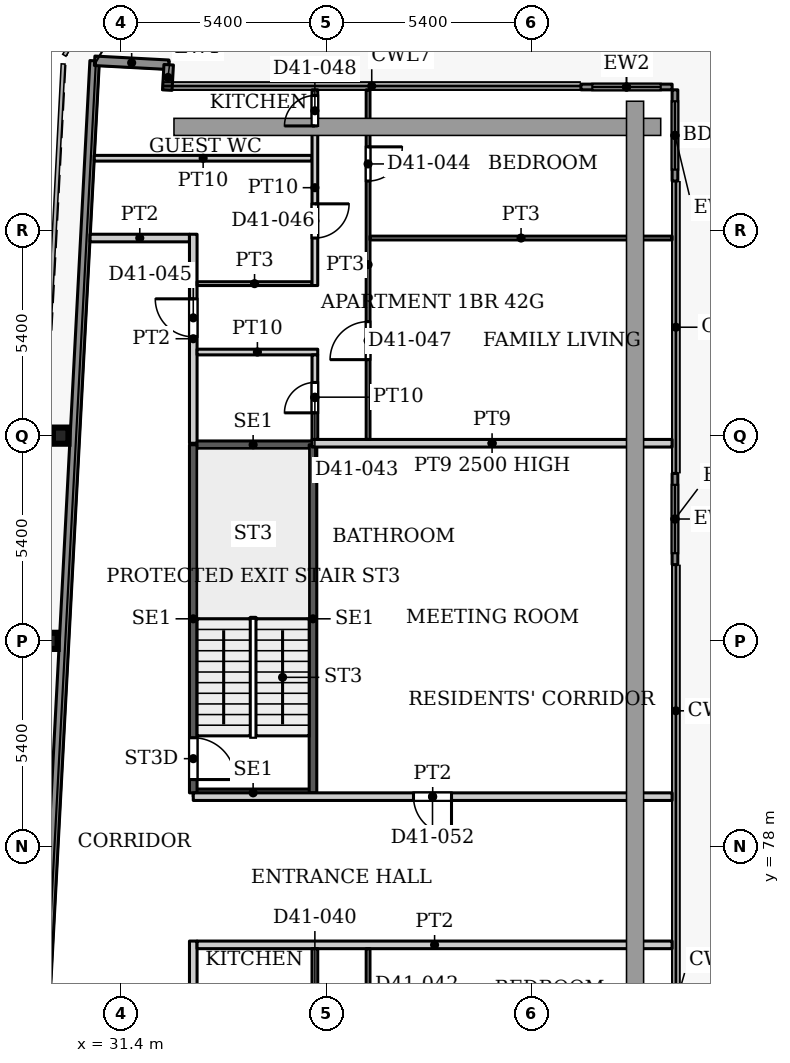
"""IFC4 building model, lengths in metres.
Left out: names, types, materials, properties, quantities, classifications, styles, units other than length and angle.
Written with IfcOpenShell. Run it as: python <this file> out.ifc"""

import sys

from ifc_helpers import new_model, si_unit, direction, frame, frame_2d, origin, origin_2d, place, context, subcontext, project, spatial, rectangle, i_section, extrude, source, transform, mapped, element, fill, save


model = new_model("IFC4")
c1 = context("Model", 3, precision=1e-05, world=origin(), true_north=direction((0.0, 1.0)))
c2 = subcontext(c1, "Body", "Model", "MODEL_VIEW")
j1 = project(units=[si_unit("LENGTHUNIT", "METRE"), si_unit("PLANEANGLEUNIT", "RADIAN")], contexts=[c1])
p1 = place(None, origin())
s1 = spatial("IfcSite", under=j1, at=p1, CompositionType="ELEMENT")
p2 = place(p1, origin())
s2 = spatial("IfcBuilding", under=s1, at=p2, CompositionType="ELEMENT")
p3 = place(p2, frame((0.0, 0.0, 179.9)))
s3 = spatial("IfcBuildingStorey", under=s2, at=p3, CompositionType="ELEMENT", Elevation=179.9)
for number, where, z_axis, x_axis in (
    (1, (29.527, 83.4, 0.0), (0.0, 0.0, 1.0), (1.0, 0.0, 0.0)),
    (2, (29.811, 88.8, 0.0), (0.0, 0.0, 1.0), (1.0, 0.0, 0.0)),
):
    element("IfcColumn", number, at=place(p3, frame(where, z_axis=z_axis, x_axis=x_axis)), inside=s3, PredefinedType="COLUMN", context=c2, shape_type="SweptSolid", body=[
        extrude(i_section(OverallWidth=0.409, OverallDepth=0.425, WebThickness=0.033, FlangeThickness=0.052, FilletRadius=0.013, at=origin_2d()), origin(), (0.0, 0.0, 1.0), 3.9),
    ])
p4 = place(p3, frame((27.195, 31.969, 0.0), z_axis=(0.0, 0.0, 1.0), x_axis=(0.052554995867, 0.998618031286, 0.0)))
e3 = element("IfcWall", 3, at=p4, inside=s3, PredefinedType="SOLIDWALL", context=c2, shape_type="SweptSolid", body=[
    extrude(rectangle(XDim=66.787, YDim=0.25, at=frame_2d((33.394, 0.0))), origin(), (0.0, 0.0, 1.0), 3.75),
])
p5 = place(p3, frame((30.705, 98.664, 0.0), z_axis=(0.0, 0.0, 1.0), x_axis=(0.998577785791, -0.053314216913, 0.0)))
e4 = element("IfcWall", 4, at=p5, inside=s3, PredefinedType="SOLIDWALL", context=c2, shape_type="SweptSolid", body=[
    extrude(rectangle(XDim=1.951, YDim=0.25, at=frame_2d((0.975, 0.0))), origin(), (0.0, 0.0, 1.0), 3.75),
])
p6 = place(p3, frame((32.653, 98.56, 0.0), z_axis=(0.0, 0.0, 1.0), x_axis=(-0.054093451632, -0.998535877418, 0.0)))
e5 = element("IfcWall", 5, at=p6, inside=s3, PredefinedType="SOLIDWALL", context=c2, shape_type="SweptSolid", body=[
    extrude(rectangle(XDim=0.668, YDim=0.25, at=frame_2d((0.334, 0.0))), origin(), (0.0, 0.0, 1.0), 3.75),
])
p7 = place(p3, frame((43.5, 97.975, 0.0), z_axis=(0.0, 0.0, 1.0), x_axis=(1.0, 0.0, 0.0)))
e6 = element("IfcWall", 6, at=p7, inside=s3, PredefinedType="SOLIDWALL", context=c2, shape_type="SweptSolid", body=[
    extrude(rectangle(XDim=2.4, YDim=0.15, at=frame_2d((1.2, 0.0))), origin(), (0.0, 0.0, 1.0), 3.75),
])
p8 = place(p7, frame((0.3, 0.0, 0.0)))
e7 = element("IfcOpeningElement", 7, at=p8, cuts=e6, PredefinedType="OPENING", context=c2, shape_type="SweptSolid", body=[
    extrude(rectangle(XDim=1.8, YDim=2.4, at=frame_2d((0.9, 1.2))), frame((0.0, 0.085, 0.0), z_axis=(0.0, -1.0, 0.0), x_axis=(1.0, 0.0, 0.0)), (0.0, 0.0, 1.0), 0.17),
])
p9 = place(p3, frame((45.975, 97.9, 0.0), z_axis=(0.0, 0.0, 1.0), x_axis=(0.0, -1.0, 0.0)))
e8 = element("IfcWall", 8, at=p9, inside=s3, PredefinedType="SOLIDWALL", context=c2, shape_type="SweptSolid", body=[
    extrude(rectangle(XDim=2.4, YDim=0.15, at=frame_2d((1.2, 0.0))), origin(), (0.0, 0.0, 1.0), 3.75),
])
p10 = place(p9, frame((0.3, 0.0, 0.0)))
e9 = element("IfcOpeningElement", 9, at=p10, cuts=e8, PredefinedType="OPENING", context=c2, shape_type="SweptSolid", body=[
    extrude(rectangle(XDim=1.8, YDim=2.4, at=frame_2d((0.9, 1.2))), frame((0.0, 0.085, 0.0), z_axis=(0.0, -1.0, 0.0), x_axis=(1.0, 0.0, 0.0)), (0.0, 0.0, 1.0), 0.17),
])
p11 = place(p3, frame((45.975, 87.806, 0.0), z_axis=(0.0, 0.0, 1.0), x_axis=(0.0, -1.0, 0.0)))
e10 = element("IfcWall", 10, at=p11, inside=s3, PredefinedType="SOLIDWALL", context=c2, shape_type="SweptSolid", body=[
    extrude(rectangle(XDim=2.4, YDim=0.15, at=frame_2d((1.2, 0.0))), origin(), (0.0, 0.0, 1.0), 3.75),
])
p12 = place(p11, frame((0.3, 0.0, 0.0)))
e11 = element("IfcOpeningElement", 11, at=p12, cuts=e10, PredefinedType="OPENING", context=c2, shape_type="SweptSolid", body=[
    extrude(rectangle(XDim=1.8, YDim=2.4, at=frame_2d((0.9, 1.2))), frame((0.0, 0.085, 0.0), z_axis=(0.0, -1.0, 0.0), x_axis=(1.0, 0.0, 0.0)), (0.0, 0.0, 1.0), 0.17),
])
for number, where, z_axis, x_axis in (
    (12, (33.3, 79.4, 0.0), (0.0, 0.0, 1.0), (1.0, 0.0, 0.0)),
    (13, (33.3, 88.56, 0.0), (0.0, 0.0, 1.0), (1.0, 0.0, 0.0)),
):
    element("IfcWall", number, at=place(p3, frame(where, z_axis=z_axis, x_axis=x_axis)), inside=s3, PredefinedType="SHEAR", context=c2, shape_type="SweptSolid", body=[
        extrude(rectangle(XDim=3.15, YDim=0.2, at=frame_2d((1.575, 0.0))), origin(), (0.0, 0.0, 1.0), 3.9),
    ])
p13 = place(p3, frame((33.3, 79.4, 0.0), z_axis=(0.0, 0.0, 1.0), x_axis=(0.0, 1.0, 0.0)))
e14 = element("IfcWall", 14, at=p13, inside=s3, PredefinedType="SHEAR", context=c2, shape_type="SweptSolid", body=[
    extrude(rectangle(XDim=9.16, YDim=0.2, at=frame_2d((4.58, 0.0))), origin(), (0.0, 0.0, 1.0), 3.9),
])
p14 = place(p13, frame((0.35, 0.0, 0.0)))
e15 = element("IfcOpeningElement", 15, at=p14, cuts=e14, PredefinedType="OPENING", context=c2, shape_type="SweptSolid", body=[
    extrude(rectangle(XDim=1.1, YDim=2.2, at=frame_2d((0.55, 1.1))), frame((0.0, 0.11, 0.0), z_axis=(0.0, -1.0, 0.0), x_axis=(1.0, 0.0, 0.0)), (0.0, 0.0, 1.0), 0.22),
])
p15 = place(p3, frame((36.45, 79.4, 0.0), z_axis=(0.0, 0.0, 1.0), x_axis=(0.0, 1.0, 0.0)))
e16 = element("IfcWall", 16, at=p15, inside=s3, PredefinedType="SHEAR", context=c2, shape_type="SweptSolid", body=[
    extrude(rectangle(XDim=9.16, YDim=0.2, at=frame_2d((4.58, 0.0))), origin(), (0.0, 0.0, 1.0), 3.9),
])
p16 = place(p3, frame((30.695, 96.1, 0.0), z_axis=(0.0, 0.0, 1.0), x_axis=(1.0, 0.0, 0.0)))
e17 = element("IfcWall", 17, at=p16, inside=s3, PredefinedType="PARTITIONING", context=c2, shape_type="SweptSolid", body=[
    extrude(rectangle(XDim=5.73, YDim=0.15, at=frame_2d((2.865, 0.0))), origin(), (0.0, 0.0, 1.0), 3.6),
])
p17 = place(p3, frame((30.585, 94.0, 0.0), z_axis=(0.0, 0.0, 1.0), x_axis=(1.0, 0.0, 0.0)))
e18 = element("IfcWall", 18, at=p17, inside=s3, PredefinedType="PARTITIONING", context=c2, shape_type="SweptSolid", body=[
    extrude(rectangle(XDim=2.615, YDim=0.2, at=frame_2d((1.308, 0.0))), origin(), (0.0, 0.0, 1.0), 3.6),
])
p18 = place(p3, frame((33.3, 57.9, 0.0), z_axis=(0.0, 0.0, 1.0), x_axis=(0.0, 1.0, 0.0)))
e19 = element("IfcWall", 19, at=p18, inside=s3, PredefinedType="PARTITIONING", context=c2, shape_type="SweptSolid", body=[
    extrude(rectangle(XDim=17.6, YDim=0.2, at=frame_2d((8.8, 0.0))), origin(), (0.0, 0.0, 1.0), 3.6),
])
p19 = place(p18, frame((7.4, 0.0, 0.0)))
e20 = element("IfcOpeningElement", 20, at=p19, cuts=e19, PredefinedType="OPENING", context=c2, shape_type="SweptSolid", body=[
    extrude(rectangle(XDim=1.0, YDim=2.1, at=frame_2d((0.5, 1.05))), frame((0.0, 0.11, 0.0), z_axis=(0.0, -1.0, 0.0), x_axis=(1.0, 0.0, 0.0)), (0.0, 0.0, 1.0), 0.22),
])
p20 = place(p18, frame((9.2, 0.0, 0.0)))
e21 = element("IfcOpeningElement", 21, at=p20, cuts=e19, PredefinedType="OPENING", context=c2, shape_type="SweptSolid", body=[
    extrude(rectangle(XDim=1.0, YDim=2.1, at=frame_2d((0.5, 1.05))), frame((0.0, 0.11, 0.0), z_axis=(0.0, -1.0, 0.0), x_axis=(1.0, 0.0, 0.0)), (0.0, 0.0, 1.0), 0.22),
])
p21 = place(p3, frame((33.3, 79.3, 0.0), z_axis=(0.0, 0.0, 1.0), x_axis=(1.0, 0.0, 0.0)))
e22 = element("IfcWall", 22, at=p21, inside=s3, PredefinedType="PARTITIONING", context=c2, shape_type="SweptSolid", body=[
    extrude(rectangle(XDim=12.6, YDim=0.2, at=frame_2d((6.3, 0.0))), origin(), (0.0, 0.0, 1.0), 3.6),
])
p22 = place(p21, frame((5.795, 0.0, 0.0)))
e23 = element("IfcOpeningElement", 23, at=p22, cuts=e22, PredefinedType="OPENING", context=c2, shape_type="SweptSolid", body=[
    extrude(rectangle(XDim=1.0, YDim=2.1, at=frame_2d((0.5, 1.05))), frame((0.0, 0.11, 0.0), z_axis=(0.0, -1.0, 0.0), x_axis=(1.0, 0.0, 0.0)), (0.0, 0.0, 1.0), 0.22),
])
p23 = place(p3, frame((33.3, 88.6, 0.0), z_axis=(0.0, 0.0, 1.0), x_axis=(0.0, 1.0, 0.0)))
e24 = element("IfcWall", 24, at=p23, inside=s3, PredefinedType="PARTITIONING", context=c2, shape_type="SweptSolid", body=[
    extrude(rectangle(XDim=5.5, YDim=0.2, at=frame_2d((2.75, 0.0))), origin(), (0.0, 0.0, 1.0), 3.6),
])
p24 = place(p23, frame((2.8, 0.0, 0.0)))
e25 = element("IfcOpeningElement", 25, at=p24, cuts=e24, PredefinedType="OPENING", context=c2, shape_type="SweptSolid", body=[
    extrude(rectangle(XDim=1.0, YDim=2.1, at=frame_2d((0.5, 1.05))), frame((0.0, 0.11, 0.0), z_axis=(0.0, -1.0, 0.0), x_axis=(1.0, 0.0, 0.0)), (0.0, 0.0, 1.0), 0.22),
])
p25 = place(p3, frame((33.4, 75.4, 0.0), z_axis=(0.0, 0.0, 1.0), x_axis=(1.0, 0.0, 0.0)))
e26 = element("IfcWall", 26, at=p25, inside=s3, PredefinedType="PARTITIONING", context=c2, shape_type="SweptSolid", body=[
    extrude(rectangle(XDim=12.5, YDim=0.2, at=frame_2d((6.25, 0.0))), origin(), (0.0, 0.0, 1.0), 3.6),
])
p26 = place(p3, frame((33.4, 91.0, 0.0), z_axis=(0.0, 0.0, 1.0), x_axis=(1.0, 0.0, 0.0)))
e27 = element("IfcWall", 27, at=p26, inside=s3, PredefinedType="PARTITIONING", context=c2, shape_type="SweptSolid", body=[
    extrude(rectangle(XDim=3.175, YDim=0.15, at=frame_2d((1.587, 0.0))), origin(), (0.0, 0.0, 1.0), 3.6),
])
p27 = place(p3, frame((33.4, 92.8, 0.0), z_axis=(0.0, 0.0, 1.0), x_axis=(1.0, 0.0, 0.0)))
e28 = element("IfcWall", 28, at=p27, inside=s3, PredefinedType="PARTITIONING", context=c2, shape_type="SweptSolid", body=[
    extrude(rectangle(XDim=3.025, YDim=0.1, at=frame_2d((1.513, 0.0))), origin(), (0.0, 0.0, 1.0), 3.6),
])
p28 = place(p3, frame((36.425, 88.6, 0.0), z_axis=(0.0, 0.0, 1.0), x_axis=(1.0, 0.0, 0.0)))
e29 = element("IfcWall", 29, at=p28, inside=s3, PredefinedType="PARTITIONING", context=c2, shape_type="SweptSolid", body=[
    extrude(rectangle(XDim=9.475, YDim=0.2, at=frame_2d((4.737, 0.0))), origin(), (0.0, 0.0, 1.0), 2.5),
])
p29 = place(p3, frame((36.5, 68.425, 0.0), z_axis=(0.0, 0.0, 1.0), x_axis=(0.0, 1.0, 0.0)))
e30 = element("IfcWall", 30, at=p29, inside=s3, PredefinedType="PARTITIONING", context=c2, shape_type="SweptSolid", body=[
    extrude(rectangle(XDim=6.875, YDim=0.15, at=frame_2d((3.438, 0.0))), origin(), (0.0, 0.0, 1.0), 3.6),
])
p30 = place(p29, frame((0.875, 0.0, 0.0)))
e31 = element("IfcOpeningElement", 31, at=p30, cuts=e30, PredefinedType="OPENING", context=c2, shape_type="SweptSolid", body=[
    extrude(rectangle(XDim=0.8, YDim=2.1, at=frame_2d((0.4, 1.05))), frame((0.0, 0.085, 0.0), z_axis=(0.0, -1.0, 0.0), x_axis=(1.0, 0.0, 0.0)), (0.0, 0.0, 1.0), 0.17),
])
p31 = place(p29, frame((5.025, 0.0, 0.0)))
e32 = element("IfcOpeningElement", 32, at=p31, cuts=e30, PredefinedType="OPENING", context=c2, shape_type="SweptSolid", body=[
    extrude(rectangle(XDim=0.9, YDim=2.1, at=frame_2d((0.45, 1.05))), frame((0.0, 0.085, 0.0), z_axis=(0.0, -1.0, 0.0), x_axis=(1.0, 0.0, 0.0)), (0.0, 0.0, 1.0), 0.17),
])
p32 = place(p29, frame((2.825, 0.0, 0.0)))
e33 = element("IfcOpeningElement", 33, at=p32, cuts=e30, PredefinedType="OPENING", context=c2, shape_type="SweptSolid", body=[
    extrude(rectangle(XDim=0.8, YDim=2.1, at=frame_2d((0.4, 1.05))), frame((0.0, 0.085, 0.0), z_axis=(0.0, -1.0, 0.0), x_axis=(1.0, 0.0, 0.0)), (0.0, 0.0, 1.0), 0.17),
])
p33 = place(p3, frame((36.5, 88.7, 0.0), z_axis=(0.0, 0.0, 1.0), x_axis=(0.0, 1.0, 0.0)))
e34 = element("IfcWall", 34, at=p33, inside=s3, PredefinedType="PARTITIONING", context=c2, shape_type="SweptSolid", body=[
    extrude(rectangle(XDim=2.225, YDim=0.15, at=frame_2d((1.113, 0.0))), origin(), (0.0, 0.0, 1.0), 3.6),
])
p34 = place(p33, frame((0.7, 0.0, 0.0)))
e35 = element("IfcOpeningElement", 35, at=p34, cuts=e34, PredefinedType="OPENING", context=c2, shape_type="SweptSolid", body=[
    extrude(rectangle(XDim=0.8, YDim=2.1, at=frame_2d((0.4, 1.05))), frame((0.0, 0.085, 0.0), z_axis=(0.0, -1.0, 0.0), x_axis=(1.0, 0.0, 0.0)), (0.0, 0.0, 1.0), 0.17),
])
p35 = place(p3, frame((36.5, 92.75, 0.0), z_axis=(0.0, 0.0, 1.0), x_axis=(0.0, 1.0, 0.0)))
e36 = element("IfcWall", 36, at=p35, inside=s3, PredefinedType="PARTITIONING", context=c2, shape_type="SweptSolid", body=[
    extrude(rectangle(XDim=5.15, YDim=0.15, at=frame_2d((2.575, 0.0))), origin(), (0.0, 0.0, 1.0), 3.6),
])
p36 = place(p35, frame((1.25, 0.0, 0.0)))
e37 = element("IfcOpeningElement", 37, at=p36, cuts=e36, PredefinedType="OPENING", context=c2, shape_type="SweptSolid", body=[
    extrude(rectangle(XDim=0.9, YDim=2.1, at=frame_2d((0.45, 1.05))), frame((0.0, 0.085, 0.0), z_axis=(0.0, -1.0, 0.0), x_axis=(1.0, 0.0, 0.0)), (0.0, 0.0, 1.0), 0.17),
])
p37 = place(p35, frame((4.2, 0.0, 0.0)))
e38 = element("IfcOpeningElement", 38, at=p37, cuts=e36, PredefinedType="OPENING", context=c2, shape_type="SweptSolid", body=[
    extrude(rectangle(XDim=0.8, YDim=2.1, at=frame_2d((0.4, 1.05))), frame((0.0, 0.085, 0.0), z_axis=(0.0, -1.0, 0.0), x_axis=(1.0, 0.0, 0.0)), (0.0, 0.0, 1.0), 0.17),
])
p38 = place(p3, frame((37.9, 66.8, 0.0), z_axis=(0.0, 0.0, 1.0), x_axis=(0.0, 1.0, 0.0)))
e39 = element("IfcWall", 39, at=p38, inside=s3, PredefinedType="PARTITIONING", context=c2, shape_type="SweptSolid", body=[
    extrude(rectangle(XDim=8.5, YDim=0.1, at=frame_2d((4.25, 0.0))), origin(), (0.0, 0.0, 1.0), 3.6),
])
p39 = place(p38, frame((6.2, 0.0, 0.0)))
e40 = element("IfcOpeningElement", 40, at=p39, cuts=e39, PredefinedType="OPENING", context=c2, shape_type="SweptSolid", body=[
    extrude(rectangle(XDim=0.9, YDim=2.1, at=frame_2d((0.45, 1.05))), frame((0.0, 0.06, 0.0), z_axis=(0.0, -1.0, 0.0), x_axis=(1.0, 0.0, 0.0)), (0.0, 0.0, 1.0), 0.12),
])
p40 = place(p38, frame((1.8, 0.0, 0.0)))
e41 = element("IfcOpeningElement", 41, at=p40, cuts=e39, PredefinedType="OPENING", context=c2, shape_type="SweptSolid", body=[
    extrude(rectangle(XDim=1.0, YDim=2.1, at=frame_2d((0.5, 1.05))), frame((0.0, 0.06, 0.0), z_axis=(0.0, -1.0, 0.0), x_axis=(1.0, 0.0, 0.0)), (0.0, 0.0, 1.0), 0.12),
])
p41 = place(p3, frame((37.9, 88.7, 0.0), z_axis=(0.0, 0.0, 1.0), x_axis=(0.0, 1.0, 0.0)))
e42 = element("IfcWall", 42, at=p41, inside=s3, PredefinedType="PARTITIONING", context=c2, shape_type="SweptSolid", body=[
    extrude(rectangle(XDim=9.2, YDim=0.1, at=frame_2d((4.6, 0.0))), origin(), (0.0, 0.0, 1.0), 3.6),
])
p42 = place(p41, frame((6.8, 0.0, 0.0)))
e43 = element("IfcOpeningElement", 43, at=p42, cuts=e42, PredefinedType="OPENING", context=c2, shape_type="SweptSolid", body=[
    extrude(rectangle(XDim=0.9, YDim=2.1, at=frame_2d((0.45, 1.05))), frame((0.0, 0.06, 0.0), z_axis=(0.0, -1.0, 0.0), x_axis=(1.0, 0.0, 0.0)), (0.0, 0.0, 1.0), 0.12),
])
p43 = place(p41, frame((2.1, 0.0, 0.0)))
e44 = element("IfcOpeningElement", 44, at=p43, cuts=e42, PredefinedType="OPENING", context=c2, shape_type="SweptSolid", body=[
    extrude(rectangle(XDim=1.0, YDim=2.1, at=frame_2d((0.5, 1.05))), frame((0.0, 0.06, 0.0), z_axis=(0.0, -1.0, 0.0), x_axis=(1.0, 0.0, 0.0)), (0.0, 0.0, 1.0), 0.12),
])
p44 = place(p3, frame((37.95, 94.0, 0.0), z_axis=(0.0, 0.0, 1.0), x_axis=(1.0, 0.0, 0.0)))
e45 = element("IfcWall", 45, at=p44, inside=s3, PredefinedType="PARTITIONING", context=c2, shape_type="SweptSolid", body=[
    extrude(rectangle(XDim=7.95, YDim=0.1, at=frame_2d((3.975, 0.0))), origin(), (0.0, 0.0, 1.0), 3.6),
])
m1 = source(origin(), c2, "Body", "SweptSolid", [
    extrude(rectangle(XDim=1.8, YDim=2.4, at=frame_2d((0.9, 1.2))), frame((0.0, 0.025, 0.0), z_axis=(0.0, -1.0, 0.0), x_axis=(1.0, 0.0, 0.0)), (0.0, 0.0, 1.0), 0.05),
])
p45 = place(p8, origin())
e46 = element("IfcDoor", 46, at=p45, inside=s3, OperationType="SLIDING_TO_LEFT", PredefinedType="DOOR", context=c2, shape_type="MappedRepresentation", body=[
    mapped(m1, transform((0.0, 0.0, 0.0), x_axis=(1.0, 0.0, 0.0), y_axis=(0.0, 1.0, 0.0), z_axis=(0.0, 0.0, 1.0), scale=1.0)),
])
fill(e7, e46)
p46 = place(p10, origin())
e47 = element("IfcDoor", 47, at=p46, inside=s3, OperationType="SLIDING_TO_LEFT", PredefinedType="DOOR", context=c2, shape_type="MappedRepresentation", body=[
    mapped(m1, transform((0.0, 0.0, 0.0), x_axis=(1.0, 0.0, 0.0), y_axis=(0.0, 1.0, 0.0), z_axis=(0.0, 0.0, 1.0), scale=1.0)),
])
fill(e9, e47)
p47 = place(p12, origin())
e48 = element("IfcDoor", 48, at=p47, inside=s3, OperationType="SLIDING_TO_LEFT", PredefinedType="DOOR", context=c2, shape_type="MappedRepresentation", body=[
    mapped(m1, transform((0.0, 0.0, 0.0), x_axis=(1.0, 0.0, 0.0), y_axis=(0.0, 1.0, 0.0), z_axis=(0.0, 0.0, 1.0), scale=1.0)),
])
fill(e11, e48)
m2 = source(origin(), c2, "Body", "SweptSolid", [
    extrude(rectangle(XDim=1.1, YDim=2.2, at=frame_2d((0.55, 1.1))), frame((0.0, 0.025, 0.0), z_axis=(0.0, -1.0, 0.0), x_axis=(1.0, 0.0, 0.0)), (0.0, 0.0, 1.0), 0.05),
])
p48 = place(p14, origin())
e49 = element("IfcDoor", 49, at=p48, inside=s3, OperationType="SINGLE_SWING_RIGHT", PredefinedType="DOOR", context=c2, shape_type="MappedRepresentation", body=[
    mapped(m2, transform((0.0, 0.0, 0.0), x_axis=(1.0, 0.0, 0.0), y_axis=(0.0, 1.0, 0.0), z_axis=(0.0, 0.0, 1.0), scale=1.0)),
])
fill(e15, e49)
m3 = source(origin(), c2, "Body", "SweptSolid", [
    extrude(rectangle(XDim=0.8, YDim=2.1, at=frame_2d((0.4, 1.05))), frame((0.0, 0.025, 0.0), z_axis=(0.0, -1.0, 0.0), x_axis=(1.0, 0.0, 0.0)), (0.0, 0.0, 1.0), 0.05),
])
p49 = place(p34, origin())
e50 = element("IfcDoor", 50, at=p49, inside=s3, OperationType="SINGLE_SWING_LEFT", PredefinedType="DOOR", context=c2, shape_type="MappedRepresentation", body=[
    mapped(m3, transform((0.0, 0.0, 0.0), x_axis=(1.0, 0.0, 0.0), y_axis=(0.0, 1.0, 0.0), z_axis=(0.0, 0.0, 1.0), scale=1.0)),
])
fill(e35, e50)
m4 = source(origin(), c2, "Body", "SweptSolid", [
    extrude(rectangle(XDim=0.9, YDim=2.1, at=frame_2d((0.45, 1.05))), frame((0.0, 0.025, 0.0), z_axis=(0.0, -1.0, 0.0), x_axis=(1.0, 0.0, 0.0)), (0.0, 0.0, 1.0), 0.05),
])
p50 = place(p42, origin())
e51 = element("IfcDoor", 51, at=p50, inside=s3, OperationType="SINGLE_SWING_RIGHT", PredefinedType="DOOR", context=c2, shape_type="MappedRepresentation", body=[
    mapped(m4, transform((0.0, 0.0, 0.0), x_axis=(1.0, 0.0, 0.0), y_axis=(0.0, 1.0, 0.0), z_axis=(0.0, 0.0, 1.0), scale=1.0)),
])
fill(e43, e51)
m5 = source(origin(), c2, "Body", "SweptSolid", [
    extrude(rectangle(XDim=1.0, YDim=2.1, at=frame_2d((0.5, 1.05))), frame((0.0, 0.025, 0.0), z_axis=(0.0, -1.0, 0.0), x_axis=(1.0, 0.0, 0.0)), (0.0, 0.0, 1.0), 0.05),
])
p51 = place(p24, origin())
e52 = element("IfcDoor", 52, at=p51, inside=s3, OperationType="SINGLE_SWING_LEFT", PredefinedType="DOOR", context=c2, shape_type="MappedRepresentation", body=[
    mapped(m5, transform((0.0, 0.0, 0.0), x_axis=(1.0, 0.0, 0.0), y_axis=(0.0, 1.0, 0.0), z_axis=(0.0, 0.0, 1.0), scale=1.0)),
])
fill(e25, e52)
p52 = place(p36, origin())
e53 = element("IfcDoor", 53, at=p52, inside=s3, OperationType="SINGLE_SWING_RIGHT", PredefinedType="DOOR", context=c2, shape_type="MappedRepresentation", body=[
    mapped(m4, transform((0.0, 0.0, 0.0), x_axis=(1.0, 0.0, 0.0), y_axis=(0.0, 1.0, 0.0), z_axis=(0.0, 0.0, 1.0), scale=1.0)),
])
fill(e37, e53)
m6 = source(origin(), c2, "Body", "SweptSolid", [
    extrude(rectangle(XDim=1.0, YDim=2.1, at=frame_2d((0.5, 1.05))), frame((0.0, 0.025, 0.0), z_axis=(0.0, -1.0, 0.0), x_axis=(1.0, 0.0, 0.0)), (0.0, 0.0, 1.0), 0.05),
])
p53 = place(p43, origin())
e54 = element("IfcDoor", 54, at=p53, inside=s3, OperationType="SINGLE_SWING_LEFT", PredefinedType="DOOR", context=c2, shape_type="MappedRepresentation", body=[
    mapped(m6, transform((0.0, 0.0, 0.0), x_axis=(1.0, 0.0, 0.0), y_axis=(0.0, 1.0, 0.0), z_axis=(0.0, 0.0, 1.0), scale=1.0)),
])
fill(e44, e54)
p54 = place(p37, origin())
e55 = element("IfcDoor", 55, at=p54, inside=s3, OperationType="SINGLE_SWING_LEFT", PredefinedType="DOOR", context=c2, shape_type="MappedRepresentation", body=[
    mapped(m3, transform((0.0, 0.0, 0.0), x_axis=(1.0, 0.0, 0.0), y_axis=(0.0, 1.0, 0.0), z_axis=(0.0, 0.0, 1.0), scale=1.0)),
])
fill(e38, e55)
m7 = source(origin(), c2, "Body", "SweptSolid", [
    extrude(rectangle(XDim=1.0, YDim=2.1, at=frame_2d((0.5, 1.05))), frame((0.0, 0.025, 0.0), z_axis=(0.0, -1.0, 0.0), x_axis=(1.0, 0.0, 0.0)), (0.0, 0.0, 1.0), 0.05),
])
p55 = place(p22, origin())
e56 = element("IfcDoor", 56, at=p55, inside=s3, OperationType="SINGLE_SWING_RIGHT", PredefinedType="DOOR", context=c2, shape_type="MappedRepresentation", body=[
    mapped(m7, transform((0.0, 0.0, 0.0), x_axis=(1.0, 0.0, 0.0), y_axis=(0.0, 1.0, 0.0), z_axis=(0.0, 0.0, 1.0), scale=1.0)),
])
fill(e23, e56)
save(model, sys.argv[1])
